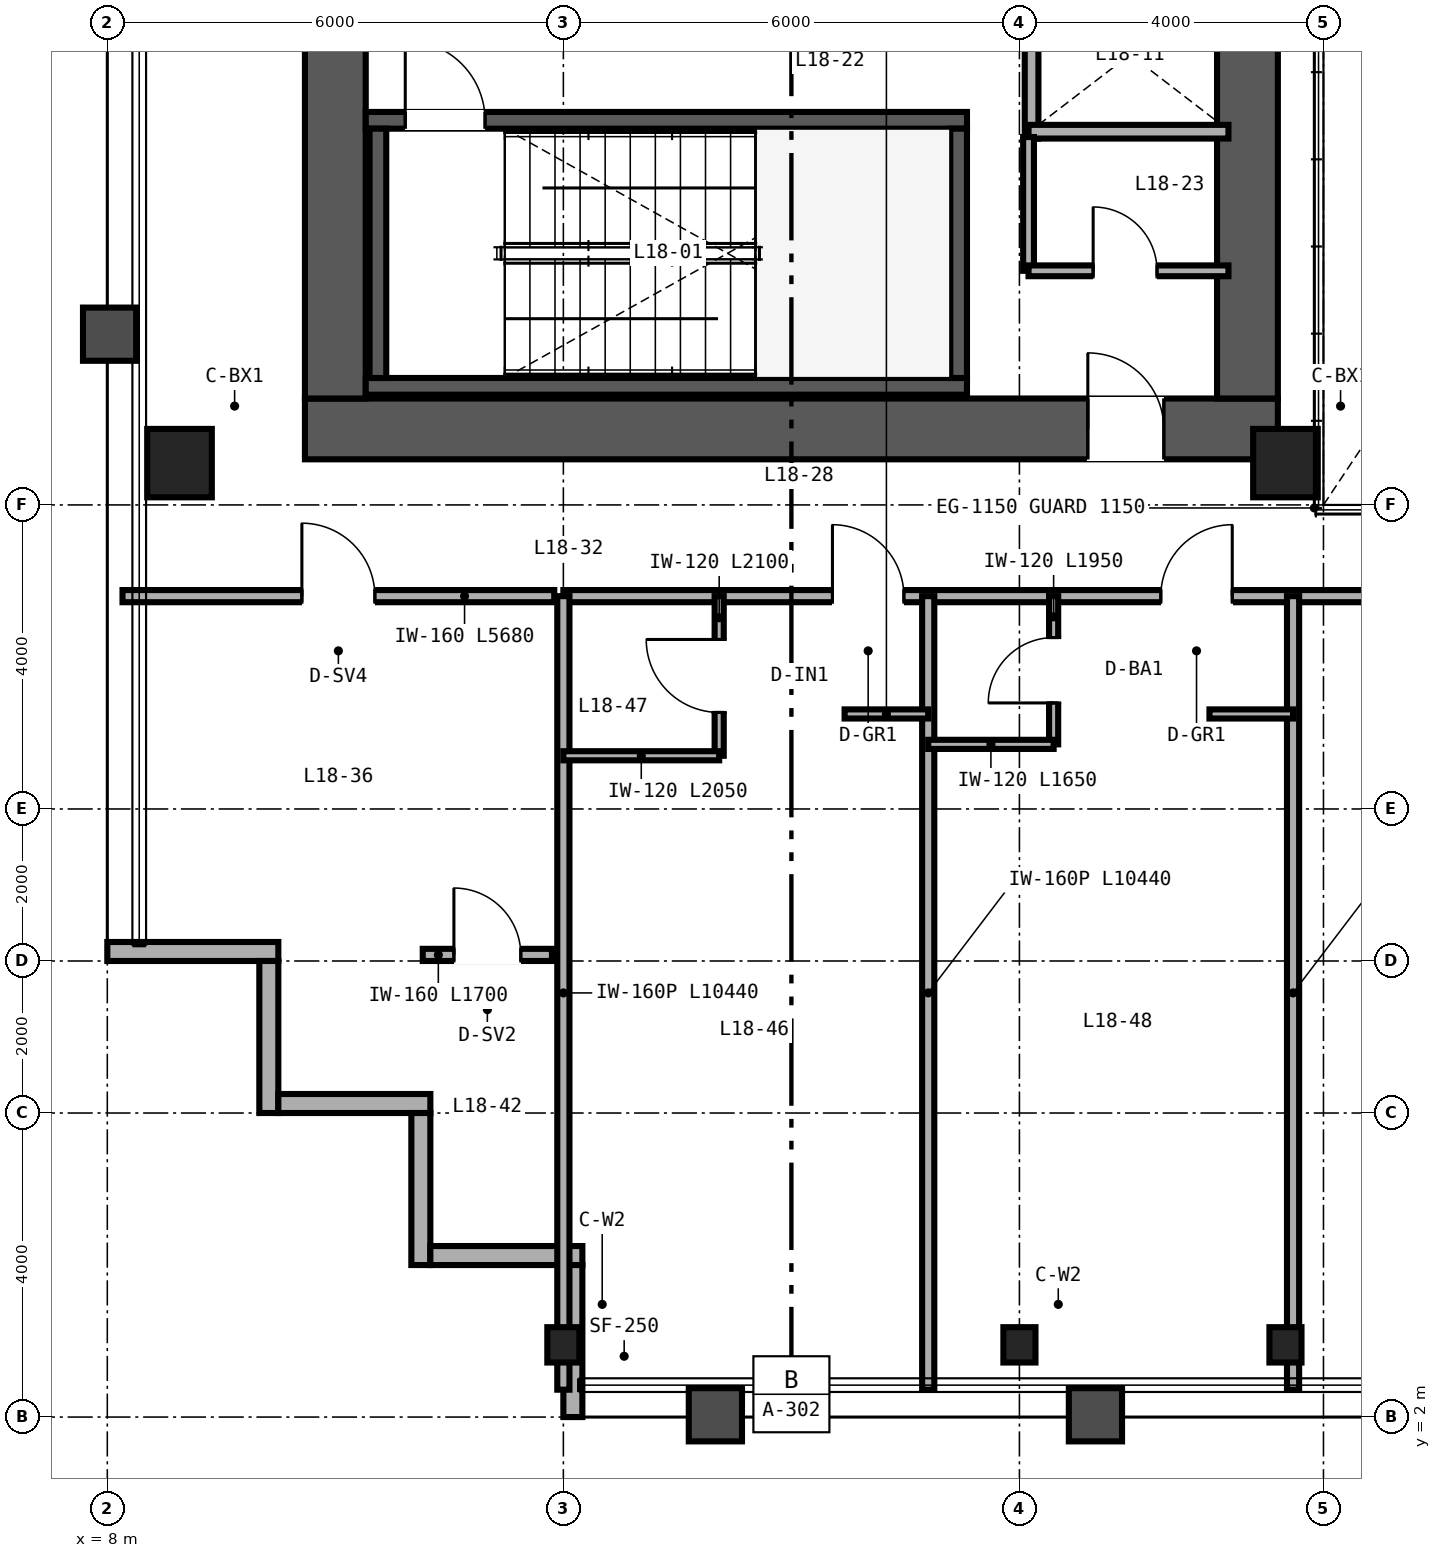
"""IFC4 building model, lengths in metres.
Left out: names, types, materials, properties, quantities, classifications, styles, units other than length and angle.
Written with IfcOpenShell. Run it as: python <this file> out.ifc"""

import sys

from ifc_helpers import new_model, si_unit, direction, frame, frame_2d, origin, origin_2d, place, context, subcontext, project, spatial, rectangle, hollow_rectangle, i_section, extrude, source, transform, mapped, element, fill, save


model = new_model("IFC4")
c1 = context("Model", 3, precision=1e-05, world=origin(), true_north=direction((0.0, 1.0)))
c2 = subcontext(c1, "Body", "Model", "MODEL_VIEW")
j1 = project(units=[si_unit("LENGTHUNIT", "METRE"), si_unit("PLANEANGLEUNIT", "RADIAN")], contexts=[c1])
p1 = place(None, origin())
s1 = spatial("IfcSite", under=j1, at=p1, CompositionType="ELEMENT")
p2 = place(p1, origin())
s2 = spatial("IfcBuilding", under=s1, at=p2, CompositionType="ELEMENT")
p3 = place(p2, frame((0.0, 0.0, 74.4)))
s3 = spatial("IfcBuildingStorey", under=s2, at=p3, CompositionType="ELEMENT", Elevation=74.4)
p4 = place(p3, frame((10.6, 15.0, 0.0), z_axis=(0.0, 0.0, 1.0), x_axis=(1.0, 0.0, 0.0)))
e1 = element("IfcWall", 1, at=p4, inside=s3, PredefinedType="SHEAR", context=c2, shape_type="SweptSolid", body=[
    extrude(rectangle(XDim=12.8, YDim=0.8, at=frame_2d((6.4, 0.0))), origin(), (0.0, 0.0, 1.0), 3.35),
])
p5 = place(p4, frame((10.3, 0.0, 0.0)))
e2 = element("IfcOpeningElement", 2, at=p5, cuts=e1, PredefinedType="OPENING", context=c2, shape_type="SweptSolid", body=[
    extrude(rectangle(XDim=1.0, YDim=2.15, at=frame_2d((0.5, 1.075))), frame((0.0, 0.41, 0.0), z_axis=(0.0, -1.0, 0.0), x_axis=(1.0, 0.0, 0.0)), (0.0, 0.0, 1.0), 0.82),
])
for number, where, z_axis, x_axis in (
    (3, (11.0, 15.4, 0.0), (0.0, 0.0, 1.0), (0.0, 1.0, 0.0)),
    (4, (23.0, 15.4, 0.0), (0.0, 0.0, 1.0), (0.0, 1.0, 0.0)),
):
    element("IfcWall", number, at=place(p3, frame(where, z_axis=z_axis, x_axis=x_axis)), inside=s3, PredefinedType="SHEAR", context=c2, shape_type="SweptSolid", body=[
        extrude(rectangle(XDim=21.2, YDim=0.8, at=frame_2d((10.6, 0.0))), origin(), (0.0, 0.0, 1.0), 3.35),
    ])
p6 = place(p3, frame((11.4, 15.56, 0.0), z_axis=(0.0, 0.0, 1.0), x_axis=(1.0, 0.0, 0.0)))
e5 = element("IfcWall", 5, at=p6, inside=s3, PredefinedType="SHEAR", context=c2, shape_type="SweptSolid", body=[
    extrude(rectangle(XDim=7.91, YDim=0.22, at=frame_2d((3.955, 0.0))), origin(), (0.0, 0.0, 1.0), 3.4),
])
p7 = place(p3, frame((11.4, 19.06, 0.0), z_axis=(0.0, 0.0, 1.0), x_axis=(1.0, 0.0, 0.0)))
e6 = element("IfcWall", 6, at=p7, inside=s3, PredefinedType="SHEAR", context=c2, shape_type="SweptSolid", body=[
    extrude(rectangle(XDim=7.91, YDim=0.22, at=frame_2d((3.955, 0.0))), origin(), (0.0, 0.0, 1.0), 3.4),
])
p8 = place(p7, frame((0.52, 0.0, 0.0)))
e7 = element("IfcOpeningElement", 7, at=p8, cuts=e6, PredefinedType="OPENING", context=c2, shape_type="SweptSolid", body=[
    extrude(rectangle(XDim=1.05, YDim=2.15, at=frame_2d((0.525, 1.075))), frame((0.0, 0.12, 0.0), z_axis=(0.0, -1.0, 0.0), x_axis=(1.0, 0.0, 0.0)), (0.0, 0.0, 1.0), 0.24),
])
for number, where, z_axis, x_axis in (
    (8, (11.56, 15.67, 0.0), (0.0, 0.0, 1.0), (0.0, 1.0, 0.0)),
    (9, (19.2, 15.67, 0.0), (0.0, 0.0, 1.0), (0.0, 1.0, 0.0)),
):
    element("IfcWall", number, at=place(p3, frame(where, z_axis=z_axis, x_axis=x_axis)), inside=s3, PredefinedType="SHEAR", context=c2, shape_type="SweptSolid", body=[
        extrude(rectangle(XDim=3.28, YDim=0.22, at=frame_2d((1.64, 0.0))), origin(), (0.0, 0.0, 1.0), 3.4),
    ])
m1 = source(origin(), c2, "Body", "SweptSolid", [
    extrude(hollow_rectangle(XDim=0.85, YDim=0.9, WallThickness=0.04, at=origin_2d()), origin(), (0.0, 0.0, 1.0), 3.35),
])
for number, where, z_axis, x_axis in (
    (10, (8.95, 14.55, 0.0), (0.0, 0.0, 1.0), (1.0, 0.0, 0.0)),
    (11, (23.5, 14.55, 0.0), (0.0, 0.0, 1.0), (1.0, 0.0, 0.0)),
):
    element("IfcColumn", number, at=place(p3, frame(where, z_axis=z_axis, x_axis=x_axis)), inside=s3, PredefinedType="COLUMN", context=c2, shape_type="MappedRepresentation", body=[
        mapped(m1, transform((0.0, 0.0, 0.0), scale=1.0)),
    ])
m2 = source(origin(), c2, "Body", "SweptSolid", [
    extrude(i_section(OverallWidth=0.422, OverallDepth=0.465, WebThickness=0.045, FlangeThickness=0.073, FilletRadius=0.025, at=origin_2d()), origin(), (0.0, 0.0, 1.0), 3.35),
])
for number, where, z_axis, x_axis in (
    (12, (14.0, 2.95, 0.0), (0.0, 0.0, 1.0), (1.0, 0.0, 0.0)),
    (13, (20.0, 2.95, 0.0), (0.0, 0.0, 1.0), (1.0, 0.0, 0.0)),
    (14, (23.5, 2.95, 0.0), (0.0, 0.0, 1.0), (1.0, 0.0, 0.0)),
):
    element("IfcColumn", number, at=place(p3, frame(where, z_axis=z_axis, x_axis=x_axis)), inside=s3, PredefinedType="COLUMN", context=c2, shape_type="MappedRepresentation", body=[
        mapped(m2, transform((0.0, 0.0, 0.0), scale=1.0)),
    ])
p9 = place(p3, frame((8.0, 8.125, 0.0), z_axis=(0.0, 0.0, 1.0), x_axis=(1.0, 0.0, 0.0)))
e15 = element("IfcWall", 15, at=p9, inside=s3, PredefinedType="SOLIDWALL", context=c2, shape_type="SweptSolid", body=[
    extrude(rectangle(XDim=2.25, YDim=0.25, at=frame_2d((1.125, 0.0))), origin(), (0.0, 0.0, 1.0), 3.35),
])
for number, where, z_axis, x_axis in (
    (16, (10.125, 8.0, 0.0), (0.0, 0.0, 1.0), (0.0, -1.0, 0.0)),
    (17, (10.25, 6.125, 0.0), (0.0, 0.0, 1.0), (1.0, 0.0, 0.0)),
    (18, (12.125, 6.0, 0.0), (0.0, 0.0, 1.0), (0.0, -1.0, 0.0)),
    (19, (12.25, 4.125, 0.0), (0.0, 0.0, 1.0), (1.0, 0.0, 0.0)),
):
    element("IfcWall", number, at=place(p3, frame(where, z_axis=z_axis, x_axis=x_axis)), inside=s3, PredefinedType="SOLIDWALL", context=c2, shape_type="SweptSolid", body=[
        extrude(rectangle(XDim=2.0, YDim=0.25, at=frame_2d((1.0, 0.0))), origin(), (0.0, 0.0, 1.0), 3.35),
    ])
p10 = place(p3, frame((14.125, 4.0, 0.0), z_axis=(0.0, 0.0, 1.0), x_axis=(0.0, -1.0, 0.0)))
e20 = element("IfcWall", 20, at=p10, inside=s3, PredefinedType="SOLIDWALL", context=c2, shape_type="SweptSolid", body=[
    extrude(rectangle(XDim=2.0, YDim=0.25, at=frame_2d((1.0, 0.0))), origin(), (0.0, 0.0, 1.0), 2.657),
])
p11 = place(p3, frame((20.16, 18.82, 0.0), z_axis=(0.0, 0.0, 1.0), x_axis=(0.0, 1.0, 0.0)))
e21 = element("IfcWall", 21, at=p11, inside=s3, PredefinedType="SOLIDWALL", context=c2, shape_type="SweptSolid", body=[
    extrude(rectangle(XDim=6.32, YDim=0.18, at=frame_2d((3.16, 0.0))), origin(), (0.0, 0.0, 1.0), 2.36),
])
p12 = place(p3, frame((20.12, 18.91, 0.0), z_axis=(0.0, 0.0, 1.0), x_axis=(1.0, 0.0, 0.0)))
e22 = element("IfcWall", 22, at=p12, inside=s3, PredefinedType="SOLIDWALL", context=c2, shape_type="SweptSolid", body=[
    extrude(rectangle(XDim=2.63, YDim=0.18, at=frame_2d((1.315, 0.0))), origin(), (0.0, 0.0, 1.0), 3.35),
])
p13 = place(p3, frame((20.12, 17.08, 0.0), z_axis=(0.0, 0.0, 1.0), x_axis=(0.0, 1.0, 0.0)))
e23 = element("IfcWall", 23, at=p13, inside=s3, PredefinedType="PARTITIONING", context=c2, shape_type="SweptSolid", body=[
    extrude(rectangle(XDim=1.76, YDim=0.142, at=frame_2d((0.88, 0.0))), origin(), (0.0, 0.0, 1.0), 3.35),
])
p14 = place(p3, frame((20.12, 17.08, 0.0), z_axis=(0.0, 0.0, 1.0), x_axis=(1.0, 0.0, 0.0)))
e24 = element("IfcWall", 24, at=p14, inside=s3, PredefinedType="PARTITIONING", context=c2, shape_type="SweptSolid", body=[
    extrude(rectangle(XDim=2.63, YDim=0.142, at=frame_2d((1.315, 0.0))), origin(), (0.0, 0.0, 1.0), 3.35),
])
p15 = place(p14, frame((0.85, 0.0, 0.0)))
e25 = element("IfcOpeningElement", 25, at=p15, cuts=e24, PredefinedType="OPENING", context=c2, shape_type="SweptSolid", body=[
    extrude(rectangle(XDim=0.84, YDim=2.1, at=frame_2d((0.42, 1.05))), frame((0.0, 0.081, 0.0), z_axis=(0.0, -1.0, 0.0), x_axis=(1.0, 0.0, 0.0)), (0.0, 0.0, 1.0), 0.162),
])
p16 = place(p3, frame((8.2, 12.8, 0.0), z_axis=(0.0, 0.0, 1.0), x_axis=(1.0, 0.0, 0.0)))
e26 = element("IfcWall", 26, at=p16, inside=s3, PredefinedType="PARTITIONING", context=c2, shape_type="SweptSolid", body=[
    extrude(rectangle(XDim=5.68, YDim=0.16, at=frame_2d((2.84, 0.0))), origin(), (0.0, 0.0, 1.0), 3.35),
])
p17 = place(p16, frame((2.36, 0.0, 0.0)))
e27 = element("IfcOpeningElement", 27, at=p17, cuts=e26, PredefinedType="OPENING", context=c2, shape_type="SweptSolid", body=[
    extrude(rectangle(XDim=0.96, YDim=2.15, at=frame_2d((0.48, 1.075))), frame((0.0, 0.09, 0.0), z_axis=(0.0, -1.0, 0.0), x_axis=(1.0, 0.0, 0.0)), (0.0, 0.0, 1.0), 0.18),
])
p18 = place(p3, frame((12.15, 8.08, 0.0), z_axis=(0.0, 0.0, 1.0), x_axis=(1.0, 0.0, 0.0)))
e28 = element("IfcWall", 28, at=p18, inside=s3, PredefinedType="PARTITIONING", context=c2, shape_type="SweptSolid", body=[
    extrude(rectangle(XDim=1.7, YDim=0.16, at=frame_2d((0.85, 0.0))), origin(), (0.0, 0.0, 1.0), 3.35),
])
p19 = place(p18, frame((0.41, 0.0, 0.0)))
e29 = element("IfcOpeningElement", 29, at=p19, cuts=e28, PredefinedType="OPENING", context=c2, shape_type="SweptSolid", body=[
    extrude(rectangle(XDim=0.88, YDim=2.15, at=frame_2d((0.44, 1.075))), frame((0.0, 0.09, 0.0), z_axis=(0.0, -1.0, 0.0), x_axis=(1.0, 0.0, 0.0)), (0.0, 0.0, 1.0), 0.18),
])
p20 = place(p3, frame((14.0, 12.8, 0.0), z_axis=(0.0, 0.0, 1.0), x_axis=(1.0, 0.0, 0.0)))
e30 = element("IfcWall", 30, at=p20, inside=s3, PredefinedType="PARTITIONING", context=c2, shape_type="SweptSolid", body=[
    extrude(rectangle(XDim=36.0, YDim=0.16, at=frame_2d((18.0, 0.0))), origin(), (0.0, 0.0, 1.0), 2.571),
])
p21 = place(p20, frame((3.54, 0.0, 0.0)))
e31 = element("IfcOpeningElement", 31, at=p21, cuts=e30, PredefinedType="OPENING", context=c2, shape_type="SweptSolid", body=[
    extrude(rectangle(XDim=0.94, YDim=2.15, at=frame_2d((0.47, 1.075))), frame((0.0, 0.09, 0.0), z_axis=(0.0, -1.0, 0.0), x_axis=(1.0, 0.0, 0.0)), (0.0, 0.0, 1.0), 0.18),
])
p22 = place(p20, frame((7.86, 0.0, 0.0)))
e32 = element("IfcOpeningElement", 32, at=p22, cuts=e30, PredefinedType="OPENING", context=c2, shape_type="SweptSolid", body=[
    extrude(rectangle(XDim=0.94, YDim=2.15, at=frame_2d((0.47, 1.075))), frame((0.0, 0.09, 0.0), z_axis=(0.0, -1.0, 0.0), x_axis=(1.0, 0.0, 0.0)), (0.0, 0.0, 1.0), 0.18),
])
p23 = place(p20, frame((11.92, 0.0, 0.0)))
e33 = element("IfcOpeningElement", 33, at=p23, cuts=e30, PredefinedType="OPENING", context=c2, shape_type="SweptSolid", body=[
    extrude(rectangle(XDim=0.96, YDim=2.15, at=frame_2d((0.48, 1.075))), frame((0.0, 0.09, 0.0), z_axis=(0.0, -1.0, 0.0), x_axis=(1.0, 0.0, 0.0)), (0.0, 0.0, 1.0), 0.18),
])
p24 = place(p20, frame((17.52, 0.0, 0.0)))
e34 = element("IfcOpeningElement", 34, at=p24, cuts=e30, PredefinedType="OPENING", context=c2, shape_type="SweptSolid", body=[
    extrude(rectangle(XDim=0.96, YDim=2.15, at=frame_2d((0.48, 1.075))), frame((0.0, 0.09, 0.0), z_axis=(0.0, -1.0, 0.0), x_axis=(1.0, 0.0, 0.0)), (0.0, 0.0, 1.0), 0.18),
])
p25 = place(p20, frame((24.74, 0.0, 0.0)))
e35 = element("IfcOpeningElement", 35, at=p25, cuts=e30, PredefinedType="OPENING", context=c2, shape_type="SweptSolid", body=[
    extrude(rectangle(XDim=0.94, YDim=2.15, at=frame_2d((0.47, 1.075))), frame((0.0, 0.09, 0.0), z_axis=(0.0, -1.0, 0.0), x_axis=(1.0, 0.0, 0.0)), (0.0, 0.0, 1.0), 0.18),
])
p26 = place(p20, frame((29.74, 0.0, 0.0)))
e36 = element("IfcOpeningElement", 36, at=p26, cuts=e30, PredefinedType="OPENING", context=c2, shape_type="SweptSolid", body=[
    extrude(rectangle(XDim=0.94, YDim=2.15, at=frame_2d((0.47, 1.075))), frame((0.0, 0.09, 0.0), z_axis=(0.0, -1.0, 0.0), x_axis=(1.0, 0.0, 0.0)), (0.0, 0.0, 1.0), 0.18),
])
p27 = place(p20, frame((33.02, 0.0, 0.0)))
e37 = element("IfcOpeningElement", 37, at=p27, cuts=e30, PredefinedType="OPENING", context=c2, shape_type="SweptSolid", body=[
    extrude(rectangle(XDim=0.96, YDim=2.15, at=frame_2d((0.48, 1.075))), frame((0.0, 0.09, 0.0), z_axis=(0.0, -1.0, 0.0), x_axis=(1.0, 0.0, 0.0)), (0.0, 0.0, 1.0), 0.18),
])
for number, where, z_axis, x_axis in (
    (38, (14.0, 2.36, 0.0), (0.0, 0.0, 1.0), (0.0, 1.0, 0.0)),
    (39, (18.8, 2.36, 0.0), (0.0, 0.0, 1.0), (0.0, 1.0, 0.0)),
):
    element("IfcWall", number, at=place(p3, frame(where, z_axis=z_axis, x_axis=x_axis)), inside=s3, PredefinedType="PARTITIONING", context=c2, shape_type="SweptSolid", body=[
        extrude(rectangle(XDim=10.44, YDim=0.16, at=frame_2d((5.22, 0.0))), origin(), (0.0, 0.0, 1.0), 2.657),
    ])
p28 = place(p3, frame((16.05, 10.7, 0.0), z_axis=(0.0, 0.0, 1.0), x_axis=(0.0, 1.0, 0.0)))
e40 = element("IfcWall", 40, at=p28, inside=s3, PredefinedType="PARTITIONING", context=c2, shape_type="SweptSolid", body=[
    extrude(rectangle(XDim=2.1, YDim=0.12, at=frame_2d((1.05, 0.0))), origin(), (0.0, 0.0, 1.0), 3.35),
])
p29 = place(p28, frame((0.57, 0.0, 0.0)))
e41 = element("IfcOpeningElement", 41, at=p29, cuts=e40, PredefinedType="OPENING", context=c2, shape_type="SweptSolid", body=[
    extrude(rectangle(XDim=0.96, YDim=2.15, at=frame_2d((0.48, 1.075))), frame((0.0, 0.07, 0.0), z_axis=(0.0, -1.0, 0.0), x_axis=(1.0, 0.0, 0.0)), (0.0, 0.0, 1.0), 0.14),
])
p30 = place(p3, frame((14.0, 10.7, 0.0), z_axis=(0.0, 0.0, 1.0), x_axis=(1.0, 0.0, 0.0)))
e42 = element("IfcWall", 42, at=p30, inside=s3, PredefinedType="PARTITIONING", context=c2, shape_type="SweptSolid", body=[
    extrude(rectangle(XDim=2.05, YDim=0.12, at=frame_2d((1.025, 0.0))), origin(), (0.0, 0.0, 1.0), 3.35),
])
p31 = place(p3, frame((17.7, 11.25, 0.0), z_axis=(0.0, 0.0, 1.0), x_axis=(1.0, 0.0, 0.0)))
e43 = element("IfcWall", 43, at=p31, inside=s3, PredefinedType="PARTITIONING", context=c2, shape_type="SweptSolid", body=[
    extrude(rectangle(XDim=1.1, YDim=0.12, at=frame_2d((0.55, 0.0))), origin(), (0.0, 0.0, 1.0), 3.35),
])
p32 = place(p3, frame((23.6, 2.36, 0.0), z_axis=(0.0, 0.0, 1.0), x_axis=(0.0, 1.0, 0.0)))
e44 = element("IfcWall", 44, at=p32, inside=s3, PredefinedType="PARTITIONING", context=c2, shape_type="SweptSolid", body=[
    extrude(rectangle(XDim=10.44, YDim=0.16, at=frame_2d((5.22, 0.0))), origin(), (0.0, 0.0, 1.0), 2.423),
])
p33 = place(p3, frame((20.45, 10.85, 0.0), z_axis=(0.0, 0.0, 1.0), x_axis=(0.0, 1.0, 0.0)))
e45 = element("IfcWall", 45, at=p33, inside=s3, PredefinedType="PARTITIONING", context=c2, shape_type="SweptSolid", body=[
    extrude(rectangle(XDim=1.95, YDim=0.12, at=frame_2d((0.975, 0.0))), origin(), (0.0, 0.0, 1.0), 3.35),
])
p34 = place(p33, frame((0.545, 0.0, 0.0)))
e46 = element("IfcOpeningElement", 46, at=p34, cuts=e45, PredefinedType="OPENING", context=c2, shape_type="SweptSolid", body=[
    extrude(rectangle(XDim=0.86, YDim=2.1, at=frame_2d((0.43, 1.05))), frame((0.0, 0.07, 0.0), z_axis=(0.0, -1.0, 0.0), x_axis=(1.0, 0.0, 0.0)), (0.0, 0.0, 1.0), 0.14),
])
p35 = place(p3, frame((18.8, 10.85, 0.0), z_axis=(0.0, 0.0, 1.0), x_axis=(1.0, 0.0, 0.0)))
e47 = element("IfcWall", 47, at=p35, inside=s3, PredefinedType="PARTITIONING", context=c2, shape_type="SweptSolid", body=[
    extrude(rectangle(XDim=1.65, YDim=0.12, at=frame_2d((0.825, 0.0))), origin(), (0.0, 0.0, 1.0), 3.35),
])
p36 = place(p3, frame((22.5, 11.25, 0.0), z_axis=(0.0, 0.0, 1.0), x_axis=(1.0, 0.0, 0.0)))
e48 = element("IfcWall", 48, at=p36, inside=s3, PredefinedType="PARTITIONING", context=c2, shape_type="SweptSolid", body=[
    extrude(rectangle(XDim=1.1, YDim=0.12, at=frame_2d((0.55, 0.0))), origin(), (0.0, 0.0, 1.0), 2.571),
])
m3 = source(origin(), c2, "Body", "SweptSolid", [
    extrude(rectangle(XDim=1.05, YDim=2.15, at=frame_2d((0.525, 1.075))), frame((0.0, 0.025, 0.0), z_axis=(0.0, -1.0, 0.0), x_axis=(1.0, 0.0, 0.0)), (0.0, 0.0, 1.0), 0.05),
])
p37 = place(p8, origin())
e49 = element("IfcDoor", 49, at=p37, inside=s3, OperationType="SINGLE_SWING_LEFT", PredefinedType="DOOR", context=c2, shape_type="MappedRepresentation", body=[
    mapped(m3, transform((0.0, 0.0, 0.0), scale=1.0)),
])
fill(e7, e49)
m4 = source(origin(), c2, "Body", "SweptSolid", [
    extrude(rectangle(XDim=0.84, YDim=2.1, at=frame_2d((0.42, 1.05))), frame((0.0, 0.025, 0.0), z_axis=(0.0, -1.0, 0.0), x_axis=(1.0, 0.0, 0.0)), (0.0, 0.0, 1.0), 0.05),
])
p38 = place(p15, origin())
e50 = element("IfcDoor", 50, at=p38, inside=s3, OperationType="SINGLE_SWING_LEFT", PredefinedType="DOOR", context=c2, shape_type="MappedRepresentation", body=[
    mapped(m4, transform((0.0, 0.0, 0.0), scale=1.0)),
])
fill(e25, e50)
m5 = source(origin(), c2, "Body", "SweptSolid", [
    extrude(rectangle(XDim=1.0, YDim=2.15, at=frame_2d((0.5, 1.075))), frame((0.0, 0.025, 0.0), z_axis=(0.0, -1.0, 0.0), x_axis=(1.0, 0.0, 0.0)), (0.0, 0.0, 1.0), 0.05),
])
p39 = place(p5, origin())
e51 = element("IfcDoor", 51, at=p39, inside=s3, OperationType="SINGLE_SWING_LEFT", PredefinedType="DOOR", context=c2, shape_type="MappedRepresentation", body=[
    mapped(m5, transform((0.0, 0.0, 0.0), scale=1.0)),
])
fill(e2, e51)
m6 = source(origin(), c2, "Body", "SweptSolid", [
    extrude(rectangle(XDim=0.96, YDim=2.15, at=frame_2d((0.48, 1.075))), frame((0.0, 0.025, 0.0), z_axis=(0.0, -1.0, 0.0), x_axis=(1.0, 0.0, 0.0)), (0.0, 0.0, 1.0), 0.05),
])
p40 = place(p17, origin())
e52 = element("IfcDoor", 52, at=p40, inside=s3, OperationType="SINGLE_SWING_LEFT", PredefinedType="DOOR", context=c2, shape_type="MappedRepresentation", body=[
    mapped(m6, transform((0.0, 0.0, 0.0), scale=1.0)),
])
fill(e27, e52)
m7 = source(origin(), c2, "Body", "SweptSolid", [
    extrude(rectangle(XDim=0.88, YDim=2.15, at=frame_2d((0.44, 1.075))), frame((0.0, 0.025, 0.0), z_axis=(0.0, -1.0, 0.0), x_axis=(1.0, 0.0, 0.0)), (0.0, 0.0, 1.0), 0.05),
])
p41 = place(p19, origin())
e53 = element("IfcDoor", 53, at=p41, inside=s3, OperationType="SINGLE_SWING_LEFT", PredefinedType="DOOR", context=c2, shape_type="MappedRepresentation", body=[
    mapped(m7, transform((0.0, 0.0, 0.0), scale=1.0)),
])
fill(e29, e53)
p42 = place(p29, origin())
e54 = element("IfcDoor", 54, at=p42, inside=s3, OperationType="SINGLE_SWING_RIGHT", PredefinedType="DOOR", context=c2, shape_type="MappedRepresentation", body=[
    mapped(m6, transform((0.0, 0.0, 0.0), scale=1.0)),
])
fill(e41, e54)
m8 = source(origin(), c2, "Body", "SweptSolid", [
    extrude(rectangle(XDim=0.86, YDim=2.1, at=frame_2d((0.43, 1.05))), frame((0.0, 0.025, 0.0), z_axis=(0.0, -1.0, 0.0), x_axis=(1.0, 0.0, 0.0)), (0.0, 0.0, 1.0), 0.05),
])
p43 = place(p34, origin())
e55 = element("IfcDoor", 55, at=p43, inside=s3, OperationType="SINGLE_SWING_LEFT", PredefinedType="DOOR", context=c2, shape_type="MappedRepresentation", body=[
    mapped(m8, transform((0.0, 0.0, 0.0), scale=1.0)),
])
fill(e46, e55)
m9 = source(origin(), c2, "Body", "SweptSolid", [
    extrude(rectangle(XDim=0.94, YDim=2.15, at=frame_2d((0.47, 1.075))), frame((0.0, 0.025, 0.0), z_axis=(0.0, -1.0, 0.0), x_axis=(1.0, 0.0, 0.0)), (0.0, 0.0, 1.0), 0.05),
])
p44 = place(p21, origin())
e56 = element("IfcDoor", 56, at=p44, inside=s3, OperationType="SINGLE_SWING_LEFT", PredefinedType="DOOR", context=c2, shape_type="MappedRepresentation", body=[
    mapped(m9, transform((0.0, 0.0, 0.0), scale=1.0)),
])
fill(e31, e56)
p45 = place(p22, origin())
e57 = element("IfcDoor", 57, at=p45, inside=s3, OperationType="SINGLE_SWING_RIGHT", PredefinedType="DOOR", context=c2, shape_type="MappedRepresentation", body=[
    mapped(m9, transform((0.0, 0.0, 0.0), scale=1.0)),
])
fill(e32, e57)
save(model, sys.argv[1])
